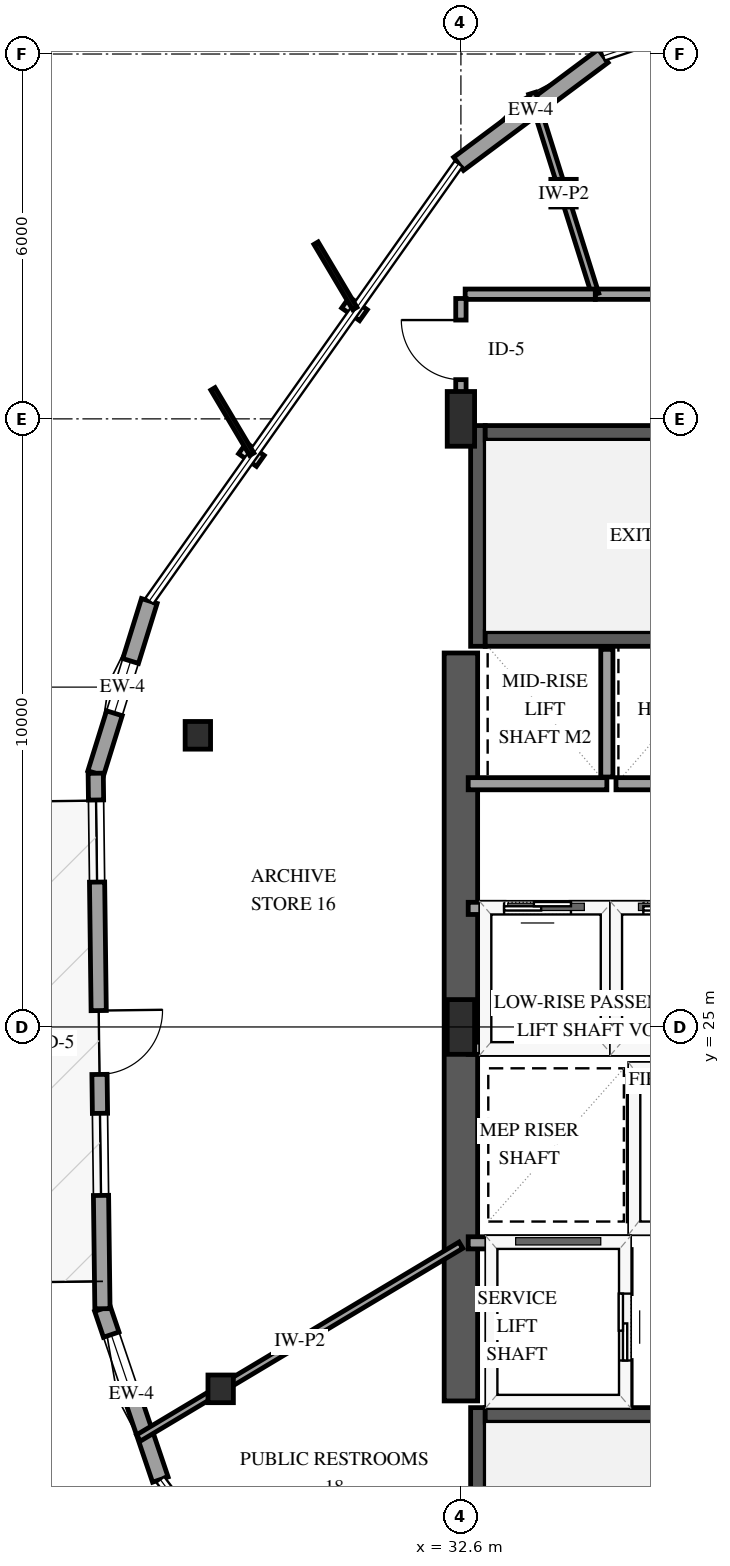
"""IFC4 building model, lengths in metres.
Left out: names, types, materials, properties, quantities, classifications, styles, units other than length and angle.
Written with IfcOpenShell. Run it as: python <this file> out.ifc"""

import sys

from ifc_helpers import new_model, si_unit, direction, frame, frame_2d, origin, origin_2d, place, context, subcontext, project, spatial, rectangle, i_section, extrude, element, fill, save


model = new_model("IFC4")
c1 = context("Model", 3, precision=1e-05, world=origin(), true_north=direction((0.0, 1.0)))
c2 = subcontext(c1, "Body", "Model", "MODEL_VIEW")
j1 = project(units=[si_unit("LENGTHUNIT", "METRE"), si_unit("PLANEANGLEUNIT", "RADIAN")], contexts=[c1])
p1 = place(None, origin())
s1 = spatial("IfcSite", under=j1, at=p1, CompositionType="ELEMENT")
p2 = place(p1, origin())
s2 = spatial("IfcBuilding", under=s1, at=p2, CompositionType="ELEMENT")
p3 = place(p2, frame((0.0, 0.0, 106.9)))
s3 = spatial("IfcBuildingStorey", under=s2, at=p3, CompositionType="ELEMENT", Elevation=106.9)
p4 = place(p3, frame((32.88, 15.11, 0.0), z_axis=(0.0, 0.0, 1.0), x_axis=(0.0, 1.0, 0.0)))
e1 = element("IfcWall", 1, at=p4, inside=s3, PredefinedType="SHEAR", context=c2, shape_type="SweptSolid", body=[
    extrude(rectangle(XDim=3.63, YDim=0.24, at=frame_2d((1.815, 0.0))), origin(), (0.0, 0.0, 1.0), 3.9),
])
p5 = place(p3, frame((33.0, 18.62, 0.0), z_axis=(0.0, 0.0, 1.0), x_axis=(1.0, 0.0, 0.0)))
e2 = element("IfcWall", 2, at=p5, inside=s3, PredefinedType="SHEAR", context=c2, shape_type="SweptSolid", body=[
    extrude(rectangle(XDim=8.0, YDim=0.24, at=frame_2d((4.0, 0.0))), origin(), (0.0, 0.0, 1.0), 3.9),
])
p6 = place(p3, frame((32.88, 31.26, 0.0), z_axis=(0.0, 0.0, 1.0), x_axis=(0.0, 1.0, 0.0)))
e3 = element("IfcWall", 3, at=p6, inside=s3, PredefinedType="SHEAR", context=c2, shape_type="SweptSolid", body=[
    extrude(rectangle(XDim=3.63, YDim=0.24, at=frame_2d((1.815, 0.0))), origin(), (0.0, 0.0, 1.0), 3.9),
])
for number, where, z_axis, x_axis in (
    (4, (33.0, 31.38, 0.0), (0.0, 0.0, 1.0), (1.0, 0.0, 0.0)),
    (5, (33.0, 34.77, 0.0), (0.0, 0.0, 1.0), (1.0, 0.0, 0.0)),
):
    element("IfcWall", number, at=place(p3, frame(where, z_axis=z_axis, x_axis=x_axis)), inside=s3, PredefinedType="SHEAR", context=c2, shape_type="SweptSolid", body=[
        extrude(rectangle(XDim=8.0, YDim=0.24, at=frame_2d((4.0, 0.0))), origin(), (0.0, 0.0, 1.0), 3.9),
    ])
p7 = place(p3, frame((32.6, 18.85, 0.0), z_axis=(0.0, 0.0, 1.0), x_axis=(0.0, 1.0, 0.0)))
e6 = element("IfcWall", 6, at=p7, inside=s3, PredefinedType="SHEAR", context=c2, shape_type="SweptSolid", body=[
    extrude(rectangle(XDim=12.3, YDim=0.55, at=frame_2d((6.15, 0.0))), origin(), (0.0, 0.0, 1.0), 3.9),
])
for number, where, z_axis, x_axis in (
    (7, (32.6, 25.0, 0.0), (0.0, 0.0, 1.0), (1.0, 0.0, 0.0)),
    (8, (32.6, 35.0, 0.0), (0.0, 0.0, 1.0), (1.0, 0.0, 0.0)),
):
    element("IfcColumn", number, at=place(p3, frame(where, z_axis=z_axis, x_axis=x_axis)), inside=s3, PredefinedType="PILASTER", context=c2, shape_type="SweptSolid", body=[
        extrude(rectangle(XDim=0.45, YDim=0.9, at=origin_2d()), origin(), (0.0, 0.0, 1.0), 3.9),
    ])
for number, where, z_axis, x_axis in (
    (9, (34.288, 38.711, 0.0), (0.0, 0.0, 1.0), (1.0, 0.0, 0.0)),
    (10, (28.274, 29.796, 0.0), (0.0, 0.0, 1.0), (1.0, 0.0, 0.0)),
    (11, (28.649, 19.049, 0.0), (0.0, 0.0, 1.0), (1.0, 0.0, 0.0)),
):
    element("IfcColumn", number, at=place(p3, frame(where, z_axis=z_axis, x_axis=x_axis)), inside=s3, PredefinedType="COLUMN", context=c2, shape_type="SweptSolid", body=[
        extrude(i_section(OverallWidth=0.418, OverallDepth=0.455, WebThickness=0.042, FlangeThickness=0.068, FilletRadius=0.038, at=origin_2d()), origin(), (0.0, 0.0, 1.0), 3.9),
    ])
p8 = place(p3, frame((34.94, 40.968, 0.0), z_axis=(0.0, 0.0, 1.0), x_axis=(-0.801547915112, -0.597930547622, 0.0)))
e12 = element("IfcWall", 12, at=p8, inside=s3, PredefinedType="SOLIDWALL", context=c2, shape_type="SweptSolid", body=[
    extrude(rectangle(XDim=2.966, YDim=0.27, at=frame_2d((1.483, 0.0))), origin(), (0.0, 0.0, 1.0), 2.979),
])
p9 = place(p3, frame((27.475, 32.005, 0.0), z_axis=(0.0, 0.0, 1.0), x_axis=(-0.29702819911, -0.954868707694, 0.0)))
e13 = element("IfcWall", 13, at=p9, inside=s3, PredefinedType="SOLIDWALL", context=c2, shape_type="SweptSolid", body=[
    extrude(rectangle(XDim=2.966, YDim=0.27, at=frame_2d((1.483, 0.0))), origin(), (0.0, 0.0, 1.0), 2.979),
])
p10 = place(p9, frame((1.033, 0.0, 0.75)))
e14 = element("IfcOpeningElement", 14, at=p10, cuts=e13, PredefinedType="OPENING", context=c2, shape_type="SweptSolid", body=[
    extrude(rectangle(XDim=0.9, YDim=1.5, at=frame_2d((0.45, 0.75))), frame((0.0, 0.145, 0.0), z_axis=(0.0, -1.0, 0.0), x_axis=(1.0, 0.0, 0.0)), (0.0, 0.0, 1.0), 0.29),
])
p11 = place(p3, frame((26.705, 20.366, 0.0), z_axis=(0.0, 0.0, 1.0), x_axis=(0.320964212706, -0.947091323032, 0.0)))
e15 = element("IfcWall", 15, at=p11, inside=s3, PredefinedType="SOLIDWALL", context=c2, shape_type="SweptSolid", body=[
    extrude(rectangle(XDim=2.967, YDim=0.27, at=frame_2d((1.483, 0.0))), origin(), (0.0, 0.0, 1.0), 2.979),
])
p12 = place(p11, frame((0.45, 0.0, 0.75)))
e16 = element("IfcOpeningElement", 16, at=p12, cuts=e15, PredefinedType="OPENING", context=c2, shape_type="SweptSolid", body=[
    extrude(rectangle(XDim=0.9, YDim=1.5, at=frame_2d((0.45, 0.75))), frame((0.0, 0.145, 0.0), z_axis=(0.0, -1.0, 0.0), x_axis=(1.0, 0.0, 0.0)), (0.0, 0.0, 1.0), 0.29),
])
p13 = place(p3, frame((26.594, 29.172, 0.0), z_axis=(0.0, 0.0, 1.0), x_axis=(0.012558271015, -0.999921141805, 0.0)))
e17 = element("IfcWall", 17, at=p13, inside=s3, PredefinedType="SOLIDWALL", context=c2, shape_type="SweptSolid", body=[
    extrude(rectangle(XDim=8.807, YDim=0.25, at=frame_2d((4.403, 0.0))), origin(), (0.0, 0.0, 1.0), 2.979),
])
p14 = place(p13, frame((3.903, 0.0, 0.0)))
e18 = element("IfcOpeningElement", 18, at=p14, cuts=e17, PredefinedType="OPENING", context=c2, shape_type="SweptSolid", body=[
    extrude(rectangle(XDim=1.05, YDim=2.15, at=frame_2d((0.525, 1.075))), frame((0.0, 0.135, 0.0), z_axis=(0.0, -1.0, 0.0), x_axis=(1.0, 0.0, 0.0)), (0.0, 0.0, 1.0), 0.27),
])
p15 = place(p13, frame((0.44, 0.0, 0.72)))
e19 = element("IfcOpeningElement", 19, at=p15, cuts=e17, PredefinedType="OPENING", context=c2, shape_type="SweptSolid", body=[
    extrude(rectangle(XDim=1.35, YDim=1.65, at=frame_2d((0.675, 0.825))), frame((0.0, 0.135, 0.0), z_axis=(0.0, -1.0, 0.0), x_axis=(1.0, 0.0, 0.0)), (0.0, 0.0, 1.0), 0.27),
])
p16 = place(p13, frame((5.593, 0.0, 0.72)))
e20 = element("IfcOpeningElement", 20, at=p16, cuts=e17, PredefinedType="OPENING", context=c2, shape_type="SweptSolid", body=[
    extrude(rectangle(XDim=1.35, YDim=1.65, at=frame_2d((0.675, 0.825))), frame((0.0, 0.135, 0.0), z_axis=(0.0, -1.0, 0.0), x_axis=(1.0, 0.0, 0.0)), (0.0, 0.0, 1.0), 0.27),
])
p17 = place(p3, frame((35.45, 21.7, 0.0), z_axis=(0.0, 0.0, 1.0), x_axis=(1.0, 0.0, 0.0)))
e21 = element("IfcWall", 21, at=p17, inside=s3, PredefinedType="SOLIDWALL", context=c2, shape_type="SweptSolid", body=[
    extrude(rectangle(XDim=2.0, YDim=0.2, at=frame_2d((1.0, 0.0))), origin(), (0.0, 0.0, 1.0), 3.6),
])
p18 = place(p17, frame((0.45, 0.0, 0.0)))
e22 = element("IfcOpeningElement", 22, at=p18, cuts=e21, PredefinedType="OPENING", context=c2, shape_type="SweptSolid", body=[
    extrude(rectangle(XDim=1.1, YDim=2.15, at=frame_2d((0.55, 1.075))), frame((0.0, 0.11, 0.0), z_axis=(0.0, -1.0, 0.0), x_axis=(1.0, 0.0, 0.0)), (0.0, 0.0, 1.0), 0.22),
])
p19 = place(p3, frame((35.45, 24.3, 0.0), z_axis=(0.0, 0.0, 1.0), x_axis=(1.0, 0.0, 0.0)))
e23 = element("IfcWall", 23, at=p19, inside=s3, PredefinedType="SOLIDWALL", context=c2, shape_type="SweptSolid", body=[
    extrude(rectangle(XDim=2.0, YDim=0.2, at=frame_2d((1.0, 0.0))), origin(), (0.0, 0.0, 1.0), 3.6),
])
p20 = place(p3, frame((35.45, 21.81, 0.0), z_axis=(0.0, 0.0, 1.0), x_axis=(0.0, 1.0, 0.0)))
e24 = element("IfcWall", 24, at=p20, inside=s3, PredefinedType="SOLIDWALL", context=c2, shape_type="SweptSolid", body=[
    extrude(rectangle(XDim=2.38, YDim=0.2, at=frame_2d((1.19, 0.0))), origin(), (0.0, 0.0, 1.0), 3.6),
])
p21 = place(p3, frame((32.72, 21.45, 0.0), z_axis=(0.0, 0.0, 1.0), x_axis=(1.0, 0.0, 0.0)))
e25 = element("IfcWall", 25, at=p21, inside=s3, PredefinedType="SOLIDWALL", context=c2, shape_type="SweptSolid", body=[
    extrude(rectangle(XDim=2.58, YDim=0.2, at=frame_2d((1.29, 0.0))), origin(), (0.0, 0.0, 1.0), 3.6),
])
p22 = place(p3, frame((35.3, 18.79, 0.0), z_axis=(0.0, 0.0, 1.0), x_axis=(0.0, 1.0, 0.0)))
e26 = element("IfcWall", 26, at=p22, inside=s3, PredefinedType="SOLIDWALL", context=c2, shape_type="SweptSolid", body=[
    extrude(rectangle(XDim=2.55, YDim=0.2, at=frame_2d((1.275, 0.0))), origin(), (0.0, 0.0, 1.0), 3.6),
])
p23 = place(p22, frame((0.725, 0.0, 0.0)))
e27 = element("IfcOpeningElement", 27, at=p23, cuts=e26, PredefinedType="OPENING", context=c2, shape_type="SweptSolid", body=[
    extrude(rectangle(XDim=1.1, YDim=2.15, at=frame_2d((0.55, 1.075))), frame((0.0, 0.11, 0.0), z_axis=(0.0, -1.0, 0.0), x_axis=(1.0, 0.0, 0.0)), (0.0, 0.0, 1.0), 0.22),
])
p24 = place(p3, frame((32.72, 24.65, 0.0), z_axis=(0.0, 0.0, 1.0), x_axis=(1.0, 0.0, 0.0)))
e28 = element("IfcWall", 28, at=p24, inside=s3, PredefinedType="SOLIDWALL", context=c2, shape_type="SweptSolid", body=[
    extrude(rectangle(XDim=2.28, YDim=0.2, at=frame_2d((1.14, 0.0))), origin(), (0.0, 0.0, 1.0), 3.6),
])
p25 = place(p3, frame((32.72, 26.95, 0.0), z_axis=(0.0, 0.0, 1.0), x_axis=(1.0, 0.0, 0.0)))
e29 = element("IfcWall", 29, at=p25, inside=s3, PredefinedType="SOLIDWALL", context=c2, shape_type="SweptSolid", body=[
    extrude(rectangle(XDim=2.28, YDim=0.2, at=frame_2d((1.14, 0.0))), origin(), (0.0, 0.0, 1.0), 3.6),
])
p26 = place(p25, frame((0.59, 0.0, 0.0)))
e30 = element("IfcOpeningElement", 30, at=p26, cuts=e29, PredefinedType="OPENING", context=c2, shape_type="SweptSolid", body=[
    extrude(rectangle(XDim=1.1, YDim=2.15, at=frame_2d((0.55, 1.075))), frame((0.0, 0.11, 0.0), z_axis=(0.0, -1.0, 0.0), x_axis=(1.0, 0.0, 0.0)), (0.0, 0.0, 1.0), 0.22),
])
p27 = place(p3, frame((35.0, 24.76, 0.0), z_axis=(0.0, 0.0, 1.0), x_axis=(0.0, 1.0, 0.0)))
e31 = element("IfcWall", 31, at=p27, inside=s3, PredefinedType="SOLIDWALL", context=c2, shape_type="SweptSolid", body=[
    extrude(rectangle(XDim=2.08, YDim=0.2, at=frame_2d((1.04, 0.0))), origin(), (0.0, 0.0, 1.0), 3.6),
])
p28 = place(p3, frame((35.15, 24.65, 0.0), z_axis=(0.0, 0.0, 1.0), x_axis=(1.0, 0.0, 0.0)))
e32 = element("IfcWall", 32, at=p28, inside=s3, PredefinedType="SOLIDWALL", context=c2, shape_type="SweptSolid", body=[
    extrude(rectangle(XDim=2.0, YDim=0.2, at=frame_2d((1.0, 0.0))), origin(), (0.0, 0.0, 1.0), 3.6),
])
p29 = place(p3, frame((35.15, 26.95, 0.0), z_axis=(0.0, 0.0, 1.0), x_axis=(1.0, 0.0, 0.0)))
e33 = element("IfcWall", 33, at=p29, inside=s3, PredefinedType="SOLIDWALL", context=c2, shape_type="SweptSolid", body=[
    extrude(rectangle(XDim=2.0, YDim=0.2, at=frame_2d((1.0, 0.0))), origin(), (0.0, 0.0, 1.0), 3.6),
])
p30 = place(p29, frame((0.45, 0.0, 0.0)))
e34 = element("IfcOpeningElement", 34, at=p30, cuts=e33, PredefinedType="OPENING", context=c2, shape_type="SweptSolid", body=[
    extrude(rectangle(XDim=1.1, YDim=2.15, at=frame_2d((0.55, 1.075))), frame((0.0, 0.11, 0.0), z_axis=(0.0, -1.0, 0.0), x_axis=(1.0, 0.0, 0.0)), (0.0, 0.0, 1.0), 0.22),
])
p31 = place(p3, frame((32.72, 29.0, 0.0), z_axis=(0.0, 0.0, 1.0), x_axis=(1.0, 0.0, 0.0)))
e35 = element("IfcWall", 35, at=p31, inside=s3, PredefinedType="SOLIDWALL", context=c2, shape_type="SweptSolid", body=[
    extrude(rectangle(XDim=2.28, YDim=0.2, at=frame_2d((1.14, 0.0))), origin(), (0.0, 0.0, 1.0), 3.6),
])
p32 = place(p3, frame((35.0, 29.11, 0.0), z_axis=(0.0, 0.0, 1.0), x_axis=(0.0, 1.0, 0.0)))
e36 = element("IfcWall", 36, at=p32, inside=s3, PredefinedType="SOLIDWALL", context=c2, shape_type="SweptSolid", body=[
    extrude(rectangle(XDim=2.1, YDim=0.2, at=frame_2d((1.05, 0.0))), origin(), (0.0, 0.0, 1.0), 3.6),
])
p33 = place(p3, frame((35.15, 29.0, 0.0), z_axis=(0.0, 0.0, 1.0), x_axis=(1.0, 0.0, 0.0)))
e37 = element("IfcWall", 37, at=p33, inside=s3, PredefinedType="SOLIDWALL", context=c2, shape_type="SweptSolid", body=[
    extrude(rectangle(XDim=2.0, YDim=0.2, at=frame_2d((1.0, 0.0))), origin(), (0.0, 0.0, 1.0), 3.6),
])
p34 = place(p3, frame((34.81, 37.05, 0.0), z_axis=(0.0, 0.0, 1.0), x_axis=(1.0, 0.0, 0.0)))
e38 = element("IfcWall", 38, at=p34, inside=s3, PredefinedType="PARTITIONING", context=c2, shape_type="SweptSolid", body=[
    extrude(rectangle(XDim=7.804, YDim=0.17, at=frame_2d((3.902, 0.0))), origin(), (0.0, 0.0, 1.0), 3.6),
])
p35 = place(p34, frame((3.427, 0.0, 0.0)))
e39 = element("IfcOpeningElement", 39, at=p35, cuts=e38, PredefinedType="OPENING", context=c2, shape_type="SweptSolid", body=[
    extrude(rectangle(XDim=0.98, YDim=2.15, at=frame_2d((0.49, 1.075))), frame((0.0, 0.095, 0.0), z_axis=(0.0, -1.0, 0.0), x_axis=(1.0, 0.0, 0.0)), (0.0, 0.0, 1.0), 0.19),
])
p36 = place(p3, frame((32.6, 21.411, 0.0), z_axis=(0.0, 0.0, 1.0), x_axis=(-0.858297424283, -0.513152542105, 0.0)))
e40 = element("IfcWall", 40, at=p36, inside=s3, PredefinedType="PARTITIONING", context=c2, shape_type="SweptSolid", body=[
    extrude(rectangle(XDim=6.177, YDim=0.12, at=frame_2d((3.089, 0.0))), origin(), (0.0, 0.0, 1.0), 3.6),
])
p37 = place(p3, frame((34.81, 37.05, 0.0), z_axis=(0.0, 0.0, 1.0), x_axis=(-0.300004387009, 0.953937821755, 0.0)))
e41 = element("IfcWall", 41, at=p37, inside=s3, PredefinedType="PARTITIONING", context=c2, shape_type="SweptSolid", body=[
    extrude(rectangle(XDim=3.463, YDim=0.12, at=frame_2d((1.732, 0.0))), origin(), (0.0, 0.0, 1.0), 2.895),
])
p38 = place(p3, frame((32.67, 37.05, 0.0), z_axis=(0.0, 0.0, 1.0), x_axis=(1.0, 0.0, 0.0)))
e42 = element("IfcWall", 42, at=p38, inside=s3, PredefinedType="PARTITIONING", context=c2, shape_type="SweptSolid", body=[
    extrude(rectangle(XDim=2.14, YDim=0.17, at=frame_2d((1.07, 0.0))), origin(), (0.0, 0.0, 1.0), 3.6),
])
p39 = place(p3, frame((32.6, 35.07, 0.0), z_axis=(0.0, 0.0, 1.0), x_axis=(0.0, 1.0, 0.0)))
e43 = element("IfcWall", 43, at=p39, inside=s3, PredefinedType="PARTITIONING", context=c2, shape_type="SweptSolid", body=[
    extrude(rectangle(XDim=1.91, YDim=0.17, at=frame_2d((0.955, 0.0))), origin(), (0.0, 0.0, 1.0), 3.6),
])
p40 = place(p39, frame((0.575, 0.0, 0.0)))
e44 = element("IfcOpeningElement", 44, at=p40, cuts=e43, PredefinedType="OPENING", context=c2, shape_type="SweptSolid", body=[
    extrude(rectangle(XDim=0.98, YDim=2.15, at=frame_2d((0.49, 1.075))), frame((0.0, 0.095, 0.0), z_axis=(0.0, -1.0, 0.0), x_axis=(1.0, 0.0, 0.0)), (0.0, 0.0, 1.0), 0.19),
])
p41 = place(p10, origin())
e45 = element("IfcWindow", 45, at=p41, inside=s3, PartitioningType="SINGLE_PANEL", PredefinedType="WINDOW", context=c2, shape_type="SweptSolid", body=[
    extrude(rectangle(XDim=0.9, YDim=1.5, at=frame_2d((0.45, 0.75))), frame((0.0, 0.03, 0.0), z_axis=(0.0, -1.0, 0.0), x_axis=(1.0, 0.0, 0.0)), (0.0, 0.0, 1.0), 0.06),
])
fill(e14, e45)
p42 = place(p12, origin())
e46 = element("IfcWindow", 46, at=p42, inside=s3, PartitioningType="SINGLE_PANEL", PredefinedType="WINDOW", context=c2, shape_type="SweptSolid", body=[
    extrude(rectangle(XDim=0.9, YDim=1.5, at=frame_2d((0.45, 0.75))), frame((0.0, 0.03, 0.0), z_axis=(0.0, -1.0, 0.0), x_axis=(1.0, 0.0, 0.0)), (0.0, 0.0, 1.0), 0.06),
])
fill(e16, e46)
p43 = place(p14, origin())
e47 = element("IfcDoor", 47, at=p43, inside=s3, OperationType="SINGLE_SWING_LEFT", PredefinedType="DOOR", context=c2, shape_type="SweptSolid", body=[
    extrude(rectangle(XDim=1.05, YDim=2.15, at=frame_2d((0.525, 1.075))), frame((0.0, 0.025, 0.0), z_axis=(0.0, -1.0, 0.0), x_axis=(1.0, 0.0, 0.0)), (0.0, 0.0, 1.0), 0.05),
])
fill(e18, e47)
p44 = place(p15, origin())
e48 = element("IfcWindow", 48, at=p44, inside=s3, PartitioningType="SINGLE_PANEL", PredefinedType="WINDOW", context=c2, shape_type="SweptSolid", body=[
    extrude(rectangle(XDim=1.35, YDim=1.65, at=frame_2d((0.675, 0.825))), frame((0.0, 0.03, 0.0), z_axis=(0.0, -1.0, 0.0), x_axis=(1.0, 0.0, 0.0)), (0.0, 0.0, 1.0), 0.06),
])
fill(e19, e48)
p45 = place(p16, origin())
e49 = element("IfcWindow", 49, at=p45, inside=s3, PartitioningType="SINGLE_PANEL", PredefinedType="WINDOW", context=c2, shape_type="SweptSolid", body=[
    extrude(rectangle(XDim=1.35, YDim=1.65, at=frame_2d((0.675, 0.825))), frame((0.0, 0.03, 0.0), z_axis=(0.0, -1.0, 0.0), x_axis=(1.0, 0.0, 0.0)), (0.0, 0.0, 1.0), 0.06),
])
fill(e20, e49)
p46 = place(p23, origin())
e50 = element("IfcDoor", 50, at=p46, inside=s3, OperationType="SLIDING_TO_LEFT", PredefinedType="DOOR", context=c2, shape_type="SweptSolid", body=[
    extrude(rectangle(XDim=1.1, YDim=2.15, at=frame_2d((0.55, 1.075))), frame((0.0, 0.025, 0.0), z_axis=(0.0, -1.0, 0.0), x_axis=(1.0, 0.0, 0.0)), (0.0, 0.0, 1.0), 0.05),
])
fill(e27, e50)
p47 = place(p26, origin())
e51 = element("IfcDoor", 51, at=p47, inside=s3, OperationType="SLIDING_TO_LEFT", PredefinedType="DOOR", context=c2, shape_type="SweptSolid", body=[
    extrude(rectangle(XDim=1.1, YDim=2.15, at=frame_2d((0.55, 1.075))), frame((0.0, 0.025, 0.0), z_axis=(0.0, -1.0, 0.0), x_axis=(1.0, 0.0, 0.0)), (0.0, 0.0, 1.0), 0.05),
])
fill(e30, e51)
p48 = place(p30, origin())
e52 = element("IfcDoor", 52, at=p48, inside=s3, OperationType="SLIDING_TO_LEFT", PredefinedType="DOOR", context=c2, shape_type="SweptSolid", body=[
    extrude(rectangle(XDim=1.1, YDim=2.15, at=frame_2d((0.55, 1.075))), frame((0.0, 0.025, 0.0), z_axis=(0.0, -1.0, 0.0), x_axis=(1.0, 0.0, 0.0)), (0.0, 0.0, 1.0), 0.05),
])
fill(e34, e52)
p49 = place(p40, origin())
e53 = element("IfcDoor", 53, at=p49, inside=s3, OperationType="SINGLE_SWING_RIGHT", PredefinedType="DOOR", context=c2, shape_type="SweptSolid", body=[
    extrude(rectangle(XDim=0.98, YDim=2.15, at=frame_2d((0.49, 1.075))), frame((0.0, 0.025, 0.0), z_axis=(0.0, -1.0, 0.0), x_axis=(1.0, 0.0, 0.0)), (0.0, 0.0, 1.0), 0.05),
])
fill(e44, e53)
save(model, sys.argv[1])
